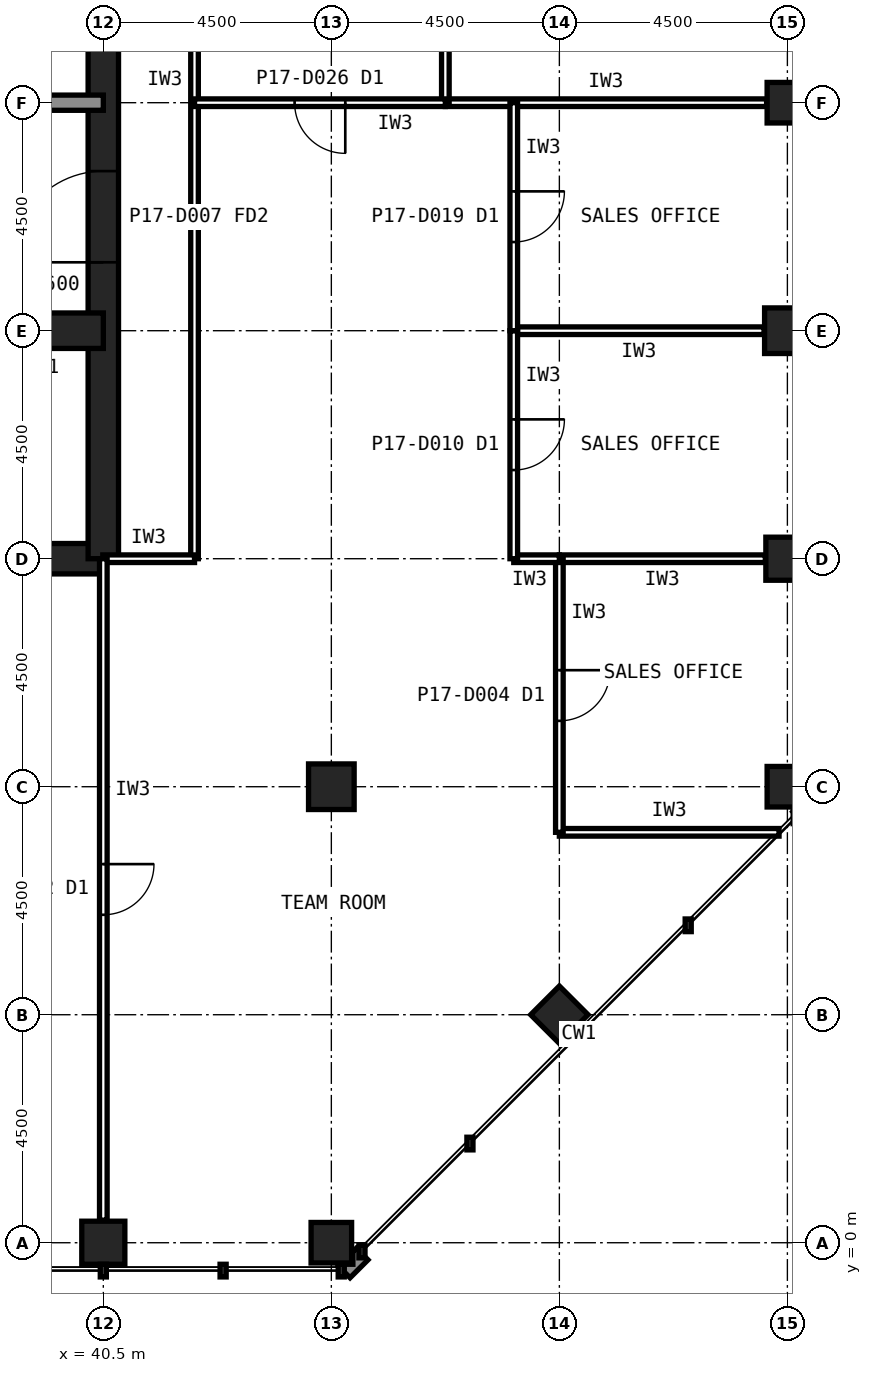
"""IFC4 building model, lengths in metres.
Left out: names, types, materials, properties, quantities, classifications, styles, units other than length and angle.
Written with IfcOpenShell. Run it as: python <this file> out.ifc"""

import sys

from ifc_helpers import new_model, si_unit, direction, frame, frame_2d, origin, origin_2d, place, context, subcontext, project, spatial, rectangle, hollow_rectangle, extrude, element, fill, save


model = new_model("IFC4")
c1 = context("Model", 3, precision=1e-05, world=origin(), true_north=direction((0.0, 1.0)))
c2 = subcontext(c1, "Body", "Model", "MODEL_VIEW")
j1 = project(units=[si_unit("LENGTHUNIT", "METRE"), si_unit("PLANEANGLEUNIT", "RADIAN")], contexts=[c1])
p1 = place(None, origin())
s1 = spatial("IfcSite", under=j1, at=p1, CompositionType="ELEMENT")
p2 = place(p1, origin())
s2 = spatial("IfcBuilding", under=s1, at=p2, CompositionType="ELEMENT")
p3 = place(p2, frame((0.0, 0.0, 71.0)))
s3 = spatial("IfcBuildingStorey", under=s2, at=p3, CompositionType="ELEMENT", Elevation=71.0)
p4 = place(p3, frame((40.5, 0.0, 0.0), z_axis=(0.0, 0.0, 1.0), x_axis=(1.0, 0.0, 0.0)))
e1 = element("IfcColumn", 1, at=p4, inside=s3, PredefinedType="COLUMN", context=c2, shape_type="SweptSolid", body=[
    extrude(hollow_rectangle(XDim=0.85, YDim=0.85, WallThickness=0.05, at=origin_2d()), origin(), (0.0, 0.0, 1.0), 4.2),
])
for number, where, z_axis, x_axis in (
    (2, (45.0, 0.0, 0.0), (0.0, 0.0, 1.0), (1.0, 0.0, 0.0)),
    (3, (54.0, 9.0, 0.0), (0.0, 0.0, 1.0), (1.0, 0.0, 0.0)),
):
    element("IfcColumn", number, at=place(p3, frame(where, z_axis=z_axis, x_axis=x_axis)), inside=s3, PredefinedType="COLUMN", context=c2, shape_type="SweptSolid", body=[
        extrude(hollow_rectangle(XDim=0.8, YDim=0.8, WallThickness=0.045, at=origin_2d()), origin(), (0.0, 0.0, 1.0), 4.2),
    ])
p5 = place(p3, frame((54.0, 13.5, 0.0), z_axis=(0.0, 0.0, 1.0), x_axis=(1.0, 0.0, 0.0)))
e4 = element("IfcColumn", 4, at=p5, inside=s3, PredefinedType="COLUMN", context=c2, shape_type="SweptSolid", body=[
    extrude(hollow_rectangle(XDim=0.85, YDim=0.85, WallThickness=0.05, at=origin_2d()), origin(), (0.0, 0.0, 1.0), 4.2),
])
p6 = place(p3, frame((54.0, 18.0, 0.0), z_axis=(0.0, 0.0, 1.0), x_axis=(1.0, 0.0, 0.0)))
e5 = element("IfcColumn", 5, at=p6, inside=s3, PredefinedType="COLUMN", context=c2, shape_type="SweptSolid", body=[
    extrude(hollow_rectangle(XDim=0.9, YDim=0.9, WallThickness=0.063, at=origin_2d()), origin(), (0.0, 0.0, 1.0), 4.2),
])
for number, where, z_axis, x_axis in (
    (6, (54.0, 22.5, 0.0), (0.0, 0.0, 1.0), (1.0, 0.0, 0.0)),
    (7, (49.5, 4.5, 0.0), (0.0, 0.0, 1.0), (0.707, 0.707, 0.0)),
):
    element("IfcColumn", number, at=place(p3, frame(where, z_axis=z_axis, x_axis=x_axis)), inside=s3, PredefinedType="COLUMN", context=c2, shape_type="SweptSolid", body=[
        extrude(hollow_rectangle(XDim=0.8, YDim=0.8, WallThickness=0.045, at=origin_2d()), origin(), (0.0, 0.0, 1.0), 4.2),
    ])
p7 = place(p3, frame((45.0, 9.0, 0.0), z_axis=(0.0, 0.0, 1.0), x_axis=(1.0, 0.0, 0.0)))
e8 = element("IfcColumn", 8, at=p7, inside=s3, PredefinedType="COLUMN", context=c2, shape_type="SweptSolid", body=[
    extrude(hollow_rectangle(XDim=0.9, YDim=0.9, WallThickness=0.063, at=origin_2d()), origin(), (0.0, 0.0, 1.0), 4.2),
])
p8 = place(p3, frame((13.5, 13.5, 0.0), z_axis=(0.0, 0.0, 1.0), x_axis=(1.0, 0.0, 0.0)))
e9 = element("IfcWall", 9, at=p8, inside=s3, PredefinedType="SHEAR", context=c2, shape_type="SweptSolid", body=[
    extrude(rectangle(XDim=27.0, YDim=0.6, at=frame_2d((13.5, 0.0))), origin(), (0.0, 0.0, 1.0), 4.2),
])
p9 = place(p3, frame((40.5, 13.5, 0.0), z_axis=(0.0, 0.0, 1.0), x_axis=(0.0, 1.0, 0.0)))
e10 = element("IfcWall", 10, at=p9, inside=s3, PredefinedType="SHEAR", context=c2, shape_type="SweptSolid", body=[
    extrude(rectangle(XDim=27.0, YDim=0.6, at=frame_2d((13.5, 0.0))), origin(), (0.0, 0.0, 1.0), 4.2),
])
p10 = place(p9, frame((5.85, 0.0, 0.0)))
e11 = element("IfcOpeningElement", 11, at=p10, cuts=e10, PredefinedType="OPENING", context=c2, shape_type="SweptSolid", body=[
    extrude(rectangle(XDim=1.8, YDim=2.1, at=frame_2d((0.9, 1.05))), frame((0.0, 0.31, 0.0), z_axis=(0.0, -1.0, 0.0), x_axis=(1.0, 0.0, 0.0)), (0.0, 0.0, 1.0), 0.62),
])
p11 = place(p9, frame((19.65, 0.0, 0.0)))
e12 = element("IfcOpeningElement", 12, at=p11, cuts=e10, PredefinedType="OPENING", context=c2, shape_type="SweptSolid", body=[
    extrude(rectangle(XDim=1.2, YDim=2.1, at=frame_2d((0.6, 1.05))), frame((0.0, 0.31, 0.0), z_axis=(0.0, -1.0, 0.0), x_axis=(1.0, 0.0, 0.0)), (0.0, 0.0, 1.0), 0.62),
])
p12 = place(p3, frame((13.5, 18.0, 0.0), z_axis=(0.0, 0.0, 1.0), x_axis=(1.0, 0.0, 0.0)))
e13 = element("IfcWall", 13, at=p12, inside=s3, PredefinedType="SHEAR", context=c2, shape_type="SweptSolid", body=[
    extrude(rectangle(XDim=27.0, YDim=0.7, at=frame_2d((13.5, 0.0))), origin(), (0.0, 0.0, 1.0), 4.2),
])
p13 = place(p12, frame((24.3, 0.0, 0.0)))
e14 = element("IfcOpeningElement", 14, at=p13, cuts=e13, PredefinedType="OPENING", context=c2, shape_type="SweptSolid", body=[
    extrude(rectangle(XDim=0.9, YDim=2.1, at=frame_2d((0.45, 1.05))), frame((0.0, 0.36, 0.0), z_axis=(0.0, -1.0, 0.0), x_axis=(1.0, 0.0, 0.0)), (0.0, 0.0, 1.0), 0.72),
])
p14 = place(p12, frame((5.45, 0.0, 0.0)))
e15 = element("IfcOpeningElement", 15, at=p14, cuts=e13, PredefinedType="OPENING", context=c2, shape_type="SweptSolid", body=[
    extrude(rectangle(XDim=1.1, YDim=2.1, at=frame_2d((0.55, 1.05))), frame((0.0, 0.36, 0.0), z_axis=(0.0, -1.0, 0.0), x_axis=(1.0, 0.0, 0.0)), (0.0, 0.0, 1.0), 0.72),
])
p15 = place(p12, frame((8.45, 0.0, 0.0)))
e16 = element("IfcOpeningElement", 16, at=p15, cuts=e13, PredefinedType="OPENING", context=c2, shape_type="SweptSolid", body=[
    extrude(rectangle(XDim=1.1, YDim=2.1, at=frame_2d((0.55, 1.05))), frame((0.0, 0.36, 0.0), z_axis=(0.0, -1.0, 0.0), x_axis=(1.0, 0.0, 0.0)), (0.0, 0.0, 1.0), 0.72),
])
p16 = place(p12, frame((11.45, 0.0, 0.0)))
e17 = element("IfcOpeningElement", 17, at=p16, cuts=e13, PredefinedType="OPENING", context=c2, shape_type="SweptSolid", body=[
    extrude(rectangle(XDim=1.1, YDim=2.1, at=frame_2d((0.55, 1.05))), frame((0.0, 0.36, 0.0), z_axis=(0.0, -1.0, 0.0), x_axis=(1.0, 0.0, 0.0)), (0.0, 0.0, 1.0), 0.72),
])
p17 = place(p12, frame((14.45, 0.0, 0.0)))
e18 = element("IfcOpeningElement", 18, at=p17, cuts=e13, PredefinedType="OPENING", context=c2, shape_type="SweptSolid", body=[
    extrude(rectangle(XDim=1.1, YDim=2.1, at=frame_2d((0.55, 1.05))), frame((0.0, 0.36, 0.0), z_axis=(0.0, -1.0, 0.0), x_axis=(1.0, 0.0, 0.0)), (0.0, 0.0, 1.0), 0.72),
])
p18 = place(p12, frame((17.45, 0.0, 0.0)))
e19 = element("IfcOpeningElement", 19, at=p18, cuts=e13, PredefinedType="OPENING", context=c2, shape_type="SweptSolid", body=[
    extrude(rectangle(XDim=1.1, YDim=2.1, at=frame_2d((0.55, 1.05))), frame((0.0, 0.36, 0.0), z_axis=(0.0, -1.0, 0.0), x_axis=(1.0, 0.0, 0.0)), (0.0, 0.0, 1.0), 0.72),
])
p19 = place(p12, frame((20.45, 0.0, 0.0)))
e20 = element("IfcOpeningElement", 20, at=p19, cuts=e13, PredefinedType="OPENING", context=c2, shape_type="SweptSolid", body=[
    extrude(rectangle(XDim=1.1, YDim=2.1, at=frame_2d((0.55, 1.05))), frame((0.0, 0.36, 0.0), z_axis=(0.0, -1.0, 0.0), x_axis=(1.0, 0.0, 0.0)), (0.0, 0.0, 1.0), 0.72),
])
p20 = place(p12, frame((1.6, 0.0, 0.0)))
e21 = element("IfcOpeningElement", 21, at=p20, cuts=e13, PredefinedType="OPENING", context=c2, shape_type="SweptSolid", body=[
    extrude(rectangle(XDim=1.3, YDim=2.2, at=frame_2d((0.65, 1.1))), frame((0.0, 0.36, 0.0), z_axis=(0.0, -1.0, 0.0), x_axis=(1.0, 0.0, 0.0)), (0.0, 0.0, 1.0), 0.72),
])
p21 = place(p3, frame((13.5, 22.5, 0.0), z_axis=(0.0, 0.0, 1.0), x_axis=(1.0, 0.0, 0.0)))
e22 = element("IfcWall", 22, at=p21, inside=s3, PredefinedType="SOLIDWALL", context=c2, shape_type="SweptSolid", body=[
    extrude(rectangle(XDim=27.0, YDim=0.3, at=frame_2d((13.5, 0.0))), origin(), (0.0, 0.0, 1.0), 4.04),
])
p22 = place(p21, frame((1.65, 0.0, 0.0)))
e23 = element("IfcOpeningElement", 23, at=p22, cuts=e22, PredefinedType="OPENING", context=c2, shape_type="SweptSolid", body=[
    extrude(rectangle(XDim=1.2, YDim=2.1, at=frame_2d((0.6, 1.05))), frame((0.0, 0.16, 0.0), z_axis=(0.0, -1.0, 0.0), x_axis=(1.0, 0.0, 0.0)), (0.0, 0.0, 1.0), 0.32),
])
p23 = place(p21, frame((6.025, 0.0, 0.0)))
e24 = element("IfcOpeningElement", 24, at=p23, cuts=e22, PredefinedType="OPENING", context=c2, shape_type="SweptSolid", body=[
    extrude(rectangle(XDim=1.0, YDim=2.1, at=frame_2d((0.5, 1.05))), frame((0.0, 0.16, 0.0), z_axis=(0.0, -1.0, 0.0), x_axis=(1.0, 0.0, 0.0)), (0.0, 0.0, 1.0), 0.32),
])
p24 = place(p21, frame((10.525, 0.0, 0.0)))
e25 = element("IfcOpeningElement", 25, at=p24, cuts=e22, PredefinedType="OPENING", context=c2, shape_type="SweptSolid", body=[
    extrude(rectangle(XDim=1.0, YDim=2.1, at=frame_2d((0.5, 1.05))), frame((0.0, 0.16, 0.0), z_axis=(0.0, -1.0, 0.0), x_axis=(1.0, 0.0, 0.0)), (0.0, 0.0, 1.0), 0.32),
])
p25 = place(p21, frame((19.75, 0.0, 0.0)))
e26 = element("IfcOpeningElement", 26, at=p25, cuts=e22, PredefinedType="OPENING", context=c2, shape_type="SweptSolid", body=[
    extrude(rectangle(XDim=1.0, YDim=2.1, at=frame_2d((0.5, 1.05))), frame((0.0, 0.16, 0.0), z_axis=(0.0, -1.0, 0.0), x_axis=(1.0, 0.0, 0.0)), (0.0, 0.0, 1.0), 0.32),
])
p26 = place(p21, frame((15.05, 0.0, 0.0)))
e27 = element("IfcOpeningElement", 27, at=p26, cuts=e22, PredefinedType="OPENING", context=c2, shape_type="SweptSolid", body=[
    extrude(rectangle(XDim=1.4, YDim=2.4, at=frame_2d((0.7, 1.2))), frame((0.0, 0.16, 0.0), z_axis=(0.0, -1.0, 0.0), x_axis=(1.0, 0.0, 0.0)), (0.0, 0.0, 1.0), 0.32),
])
p27 = place(p3, frame((42.3, 13.5, 0.0), z_axis=(0.0, 0.0, 1.0), x_axis=(0.0, 1.0, 0.0)))
e28 = element("IfcWall", 28, at=p27, inside=s3, PredefinedType="PARTITIONING", context=c2, shape_type="SweptSolid", body=[
    extrude(rectangle(XDim=28.8, YDim=0.15, at=frame_2d((14.4, 0.0))), origin(), (0.0, 0.0, 1.0), 4.04),
])
p28 = place(p27, frame((13.9, 0.0, 0.0)))
e29 = element("IfcOpeningElement", 29, at=p28, cuts=e28, PredefinedType="OPENING", context=c2, shape_type="SweptSolid", body=[
    extrude(rectangle(XDim=1.0, YDim=2.1, at=frame_2d((0.5, 1.05))), frame((0.0, 0.085, 0.0), z_axis=(0.0, -1.0, 0.0), x_axis=(1.0, 0.0, 0.0)), (0.0, 0.0, 1.0), 0.17),
])
p29 = place(p3, frame((40.49, 13.5, 0.0), z_axis=(0.0, 0.0, 1.0), x_axis=(1.0, 0.0, 0.0)))
e30 = element("IfcWall", 30, at=p29, inside=s3, PredefinedType="PARTITIONING", context=c2, shape_type="SweptSolid", body=[
    extrude(rectangle(XDim=1.81, YDim=0.15, at=frame_2d((0.905, 0.0))), origin(), (0.0, 0.0, 1.0), 3.189),
])
p30 = place(p3, frame((47.25, 22.5, 0.0), z_axis=(0.0, 0.0, 1.0), x_axis=(1.0, 0.0, 0.0)))
e31 = element("IfcWall", 31, at=p30, inside=s3, PredefinedType="PARTITIONING", context=c2, shape_type="SweptSolid", body=[
    extrude(rectangle(XDim=6.34, YDim=0.15, at=frame_2d((3.17, 0.0))), origin(), (0.0, 0.0, 1.0), 3.189),
])
p31 = place(p3, frame((47.25, 31.5, 0.0), z_axis=(0.0, 0.0, 1.0), x_axis=(0.0, -1.0, 0.0)))
e32 = element("IfcWall", 32, at=p31, inside=s3, PredefinedType="PARTITIONING", context=c2, shape_type="SweptSolid", body=[
    extrude(rectangle(XDim=9.0, YDim=0.15, at=frame_2d((4.5, 0.0))), origin(), (0.0, 0.0, 1.0), 4.04),
])
p32 = place(p31, frame((4.0, 0.0, 0.0)))
e33 = element("IfcOpeningElement", 33, at=p32, cuts=e32, PredefinedType="OPENING", context=c2, shape_type="SweptSolid", body=[
    extrude(rectangle(XDim=1.0, YDim=2.1, at=frame_2d((0.5, 1.05))), frame((0.0, 0.085, 0.0), z_axis=(0.0, -1.0, 0.0), x_axis=(1.0, 0.0, 0.0)), (0.0, 0.0, 1.0), 0.17),
])
p33 = place(p3, frame((49.5, 8.1, 0.0), z_axis=(0.0, 0.0, 1.0), x_axis=(1.0, 0.0, 0.0)))
e34 = element("IfcWall", 34, at=p33, inside=s3, PredefinedType="PARTITIONING", context=c2, shape_type="SweptSolid", body=[
    extrude(rectangle(XDim=4.335, YDim=0.15, at=frame_2d((2.168, 0.0))), origin(), (0.0, 0.0, 1.0), 4.04),
])
p34 = place(p3, frame((53.565, 13.5, 0.0), z_axis=(0.0, 0.0, 1.0), x_axis=(-1.0, 0.0, 0.0)))
e35 = element("IfcWall", 35, at=p34, inside=s3, PredefinedType="PARTITIONING", context=c2, shape_type="SweptSolid", body=[
    extrude(rectangle(XDim=4.065, YDim=0.15, at=frame_2d((2.032, 0.0))), origin(), (0.0, 0.0, 1.0), 3.189),
])
p35 = place(p3, frame((49.5, 13.5, 0.0), z_axis=(0.0, 0.0, 1.0), x_axis=(0.0, -1.0, 0.0)))
e36 = element("IfcWall", 36, at=p35, inside=s3, PredefinedType="PARTITIONING", context=c2, shape_type="SweptSolid", body=[
    extrude(rectangle(XDim=5.4, YDim=0.15, at=frame_2d((2.7, 0.0))), origin(), (0.0, 0.0, 1.0), 4.04),
])
p36 = place(p35, frame((2.2, 0.0, 0.0)))
e37 = element("IfcOpeningElement", 37, at=p36, cuts=e36, PredefinedType="OPENING", context=c2, shape_type="SweptSolid", body=[
    extrude(rectangle(XDim=1.0, YDim=2.1, at=frame_2d((0.5, 1.05))), frame((0.0, 0.085, 0.0), z_axis=(0.0, -1.0, 0.0), x_axis=(1.0, 0.0, 0.0)), (0.0, 0.0, 1.0), 0.17),
])
p37 = place(p3, frame((48.6, 13.5, 0.0), z_axis=(0.0, 0.0, 1.0), x_axis=(1.0, 0.0, 0.0)))
e38 = element("IfcWall", 38, at=p37, inside=s3, PredefinedType="PARTITIONING", context=c2, shape_type="SweptSolid", body=[
    extrude(rectangle(XDim=0.9, YDim=0.15, at=frame_2d((0.45, 0.0))), origin(), (0.0, 0.0, 1.0), 3.189),
])
p38 = place(p3, frame((53.54, 18.0, 0.0), z_axis=(0.0, 0.0, 1.0), x_axis=(-1.0, 0.0, 0.0)))
e39 = element("IfcWall", 39, at=p38, inside=s3, PredefinedType="PARTITIONING", context=c2, shape_type="SweptSolid", body=[
    extrude(rectangle(XDim=4.94, YDim=0.15, at=frame_2d((2.47, 0.0))), origin(), (0.0, 0.0, 1.0), 3.189),
])
p39 = place(p3, frame((48.6, 18.0, 0.0), z_axis=(0.0, 0.0, 1.0), x_axis=(0.0, -1.0, 0.0)))
e40 = element("IfcWall", 40, at=p39, inside=s3, PredefinedType="PARTITIONING", context=c2, shape_type="SweptSolid", body=[
    extrude(rectangle(XDim=4.5, YDim=0.15, at=frame_2d((2.25, 0.0))), origin(), (0.0, 0.0, 1.0), 4.04),
])
p40 = place(p39, frame((1.75, 0.0, 0.0)))
e41 = element("IfcOpeningElement", 41, at=p40, cuts=e40, PredefinedType="OPENING", context=c2, shape_type="SweptSolid", body=[
    extrude(rectangle(XDim=1.0, YDim=2.1, at=frame_2d((0.5, 1.05))), frame((0.0, 0.085, 0.0), z_axis=(0.0, -1.0, 0.0), x_axis=(1.0, 0.0, 0.0)), (0.0, 0.0, 1.0), 0.17),
])
p41 = place(p3, frame((48.6, 22.5, 0.0), z_axis=(0.0, 0.0, 1.0), x_axis=(0.0, -1.0, 0.0)))
e42 = element("IfcWall", 42, at=p41, inside=s3, PredefinedType="PARTITIONING", context=c2, shape_type="SweptSolid", body=[
    extrude(rectangle(XDim=4.5, YDim=0.15, at=frame_2d((2.25, 0.0))), origin(), (0.0, 0.0, 1.0), 4.04),
])
p42 = place(p41, frame((1.75, 0.0, 0.0)))
e43 = element("IfcOpeningElement", 43, at=p42, cuts=e42, PredefinedType="OPENING", context=c2, shape_type="SweptSolid", body=[
    extrude(rectangle(XDim=1.0, YDim=2.1, at=frame_2d((0.5, 1.05))), frame((0.0, 0.085, 0.0), z_axis=(0.0, -1.0, 0.0), x_axis=(1.0, 0.0, 0.0)), (0.0, 0.0, 1.0), 0.17),
])
p43 = place(p3, frame((47.25, 22.5, 0.0), z_axis=(0.0, 0.0, 1.0), x_axis=(-1.0, 0.0, 0.0)))
e44 = element("IfcWall", 44, at=p43, inside=s3, PredefinedType="PARTITIONING", context=c2, shape_type="SweptSolid", body=[
    extrude(rectangle(XDim=4.95, YDim=0.15, at=frame_2d((2.475, 0.0))), origin(), (0.0, 0.0, 1.0), 3.189),
])
p44 = place(p43, frame((1.975, 0.0, 0.0)))
e45 = element("IfcOpeningElement", 45, at=p44, cuts=e44, PredefinedType="OPENING", context=c2, shape_type="SweptSolid", body=[
    extrude(rectangle(XDim=1.0, YDim=2.1, at=frame_2d((0.5, 1.05))), frame((0.0, 0.085, 0.0), z_axis=(0.0, -1.0, 0.0), x_axis=(1.0, 0.0, 0.0)), (0.0, 0.0, 1.0), 0.17),
])
p45 = place(p3, frame((40.5, 13.5, 0.0), z_axis=(0.0, 0.0, 1.0), x_axis=(0.0, -1.0, 0.0)))
e46 = element("IfcWall", 46, at=p45, inside=s3, PredefinedType="PARTITIONING", context=c2, shape_type="SweptSolid", body=[
    extrude(rectangle(XDim=13.055, YDim=0.15, at=frame_2d((6.527, 0.0))), origin(), (0.0, 0.0, 1.0), 3.189),
])
p46 = place(p45, frame((6.028, 0.0, 0.0)))
e47 = element("IfcOpeningElement", 47, at=p46, cuts=e46, PredefinedType="OPENING", context=c2, shape_type="SweptSolid", body=[
    extrude(rectangle(XDim=1.0, YDim=2.1, at=frame_2d((0.5, 1.05))), frame((0.0, 0.085, 0.0), z_axis=(0.0, -1.0, 0.0), x_axis=(1.0, 0.0, 0.0)), (0.0, 0.0, 1.0), 0.17),
])
p47 = place(p10, origin())
e48 = element("IfcDoor", 48, at=p47, inside=s3, OperationType="SINGLE_SWING_LEFT", PredefinedType="DOOR", context=c2, shape_type="SweptSolid", body=[
    extrude(rectangle(XDim=1.8, YDim=2.1, at=frame_2d((0.9, 1.05))), frame((0.0, 0.025, 0.0), z_axis=(0.0, -1.0, 0.0), x_axis=(1.0, 0.0, 0.0)), (0.0, 0.0, 1.0), 0.05),
])
fill(e11, e48)
p48 = place(p36, origin())
e49 = element("IfcDoor", 49, at=p48, inside=s3, OperationType="SINGLE_SWING_LEFT", PredefinedType="DOOR", context=c2, shape_type="SweptSolid", body=[
    extrude(rectangle(XDim=1.0, YDim=2.1, at=frame_2d((0.5, 1.05))), frame((0.0, 0.025, 0.0), z_axis=(0.0, -1.0, 0.0), x_axis=(1.0, 0.0, 0.0)), (0.0, 0.0, 1.0), 0.05),
])
fill(e37, e49)
p49 = place(p40, origin())
e50 = element("IfcDoor", 50, at=p49, inside=s3, OperationType="SINGLE_SWING_LEFT", PredefinedType="DOOR", context=c2, shape_type="SweptSolid", body=[
    extrude(rectangle(XDim=1.0, YDim=2.1, at=frame_2d((0.5, 1.05))), frame((0.0, 0.025, 0.0), z_axis=(0.0, -1.0, 0.0), x_axis=(1.0, 0.0, 0.0)), (0.0, 0.0, 1.0), 0.05),
])
fill(e41, e50)
p50 = place(p42, origin())
e51 = element("IfcDoor", 51, at=p50, inside=s3, OperationType="SINGLE_SWING_LEFT", PredefinedType="DOOR", context=c2, shape_type="SweptSolid", body=[
    extrude(rectangle(XDim=1.0, YDim=2.1, at=frame_2d((0.5, 1.05))), frame((0.0, 0.025, 0.0), z_axis=(0.0, -1.0, 0.0), x_axis=(1.0, 0.0, 0.0)), (0.0, 0.0, 1.0), 0.05),
])
fill(e43, e51)
p51 = place(p44, origin())
e52 = element("IfcDoor", 52, at=p51, inside=s3, OperationType="SINGLE_SWING_LEFT", PredefinedType="DOOR", context=c2, shape_type="SweptSolid", body=[
    extrude(rectangle(XDim=1.0, YDim=2.1, at=frame_2d((0.5, 1.05))), frame((0.0, 0.025, 0.0), z_axis=(0.0, -1.0, 0.0), x_axis=(1.0, 0.0, 0.0)), (0.0, 0.0, 1.0), 0.05),
])
fill(e45, e52)
p52 = place(p46, origin())
e53 = element("IfcDoor", 53, at=p52, inside=s3, OperationType="SINGLE_SWING_LEFT", PredefinedType="DOOR", context=c2, shape_type="SweptSolid", body=[
    extrude(rectangle(XDim=1.0, YDim=2.1, at=frame_2d((0.5, 1.05))), frame((0.0, 0.025, 0.0), z_axis=(0.0, -1.0, 0.0), x_axis=(1.0, 0.0, 0.0)), (0.0, 0.0, 1.0), 0.05),
])
fill(e47, e53)
save(model, sys.argv[1])
